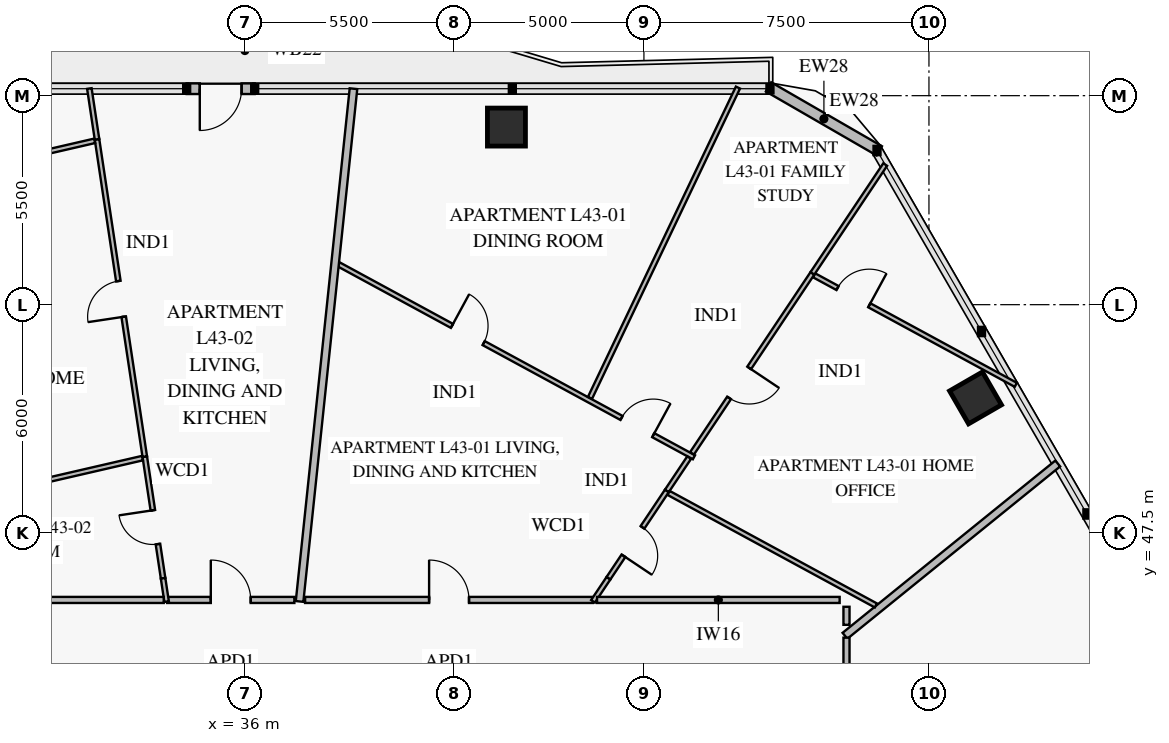
"""IFC4 building model, lengths in metres.
Left out: names, types, materials, properties, quantities, classifications, styles, units other than length and angle.
Written with IfcOpenShell. Run it as: python <this file> out.ifc"""

import sys

from ifc_helpers import new_model, si_unit, direction, frame, frame_2d, origin, origin_2d, place, context, subcontext, project, spatial, rectangle, extrude, element, fill, save


model = new_model("IFC4")
c1 = context("Model", 3, precision=1e-05, world=origin(), true_north=direction((0.0, 1.0)))
c2 = subcontext(c1, "Body", "Model", "MODEL_VIEW")
j1 = project(units=[si_unit("LENGTHUNIT", "METRE"), si_unit("PLANEANGLEUNIT", "RADIAN")], contexts=[c1])
p1 = place(None, origin())
s1 = spatial("IfcSite", under=j1, at=p1, CompositionType="ELEMENT")
p2 = place(p1, origin())
s2 = spatial("IfcBuilding", under=s1, at=p2, CompositionType="ELEMENT")
p3 = place(p2, frame((0.0, 0.0, 173.2)))
s3 = spatial("IfcBuildingStorey", under=s2, at=p3, CompositionType="ELEMENT", Elevation=173.2)
for number, where, z_axis, x_axis in (
    (1, (55.226, 51.047, 0.0), (0.0, 0.0, 1.0), (-0.5, 0.866, 0.0)),
    (2, (42.882, 58.173, 0.0), (0.0, 0.0, 1.0), (-1.0, 0.0, 0.0)),
):
    element("IfcColumn", number, at=place(p3, frame(where, z_axis=z_axis, x_axis=x_axis)), inside=s3, PredefinedType="COLUMN", context=c2, shape_type="SweptSolid", body=[
        extrude(rectangle(XDim=1.0, YDim=1.0, at=origin_2d()), origin(), (0.0, 0.0, 1.0), 3.55),
    ])
p4 = place(p3, frame((34.468, 59.183, 0.0), z_axis=(0.0, 0.0, 1.0), x_axis=(1.0, 0.0, 0.0)))
e3 = element("IfcWall", 3, at=p4, inside=s3, PredefinedType="SOLIDWALL", context=c2, shape_type="SweptSolid", body=[
    extrude(rectangle(XDim=1.79, YDim=0.28, at=frame_2d((0.895, 0.0))), origin(), (0.0, 0.0, 1.0), 3.55),
])
p5 = place(p4, frame((0.345, 0.0, 0.0)))
e4 = element("IfcOpeningElement", 4, at=p5, cuts=e3, PredefinedType="OPENING", context=c2, shape_type="SweptSolid", body=[
    extrude(rectangle(XDim=1.1, YDim=2.2, at=frame_2d((0.55, 1.1))), frame((0.0, 0.152, 0.0), z_axis=(0.0, -1.0, 0.0), x_axis=(1.0, 0.0, 0.0)), (0.0, 0.0, 1.0), 0.304),
])
p6 = place(p3, frame((49.779, 59.231, 0.0), z_axis=(0.0, 0.0, 1.0), x_axis=(0.866020068361, -0.500009241111, 0.0)))
e5 = element("IfcWall", 5, at=p6, inside=s3, PredefinedType="SOLIDWALL", context=c2, shape_type="SweptSolid", body=[
    extrude(rectangle(XDim=3.365, YDim=0.28, at=frame_2d((1.683, 0.0))), origin(), (0.0, 0.0, 1.0), 3.55),
])
p7 = place(p3, frame((47.816, 49.484, 0.0), z_axis=(0.0, 0.0, 1.0), x_axis=(-0.878822079669, 0.477149612057, 0.0)))
e6 = element("IfcWall", 6, at=p7, inside=s3, PredefinedType="PARTITIONING", context=c2, shape_type="SweptSolid", body=[
    extrude(rectangle(XDim=10.635, YDim=0.12, at=frame_2d((5.318, 0.0))), origin(), (0.0, 0.0, 1.0), 2.9),
])
p8 = place(p7, frame((1.218, 0.0, 0.0)))
e7 = element("IfcOpeningElement", 7, at=p8, cuts=e6, PredefinedType="OPENING", context=c2, shape_type="SweptSolid", body=[
    extrude(rectangle(XDim=0.95, YDim=2.1, at=frame_2d((0.475, 1.05))), frame((0.0, 0.072, 0.0), z_axis=(0.0, -1.0, 0.0), x_axis=(1.0, 0.0, 0.0)), (0.0, 0.0, 1.0), 0.144),
])
p9 = place(p7, frame((6.296, 0.0, 0.0)))
e8 = element("IfcOpeningElement", 8, at=p9, cuts=e6, PredefinedType="OPENING", context=c2, shape_type="SweptSolid", body=[
    extrude(rectangle(XDim=0.95, YDim=2.1, at=frame_2d((0.475, 1.05))), frame((0.0, 0.072, 0.0), z_axis=(0.0, -1.0, 0.0), x_axis=(1.0, 0.0, 0.0)), (0.0, 0.0, 1.0), 0.144),
])
p10 = place(p3, frame((45.566, 46.3, 0.0), z_axis=(0.0, 0.0, 1.0), x_axis=(0.55600296576, 0.831180306592, 0.0)))
e9 = element("IfcWall", 9, at=p10, inside=s3, PredefinedType="PARTITIONING", context=c2, shape_type="SweptSolid", body=[
    extrude(rectangle(XDim=2.766, YDim=0.12, at=frame_2d((1.383, 0.0))), origin(), (0.0, 0.0, 1.0), 3.55),
])
p11 = place(p10, frame((0.712, 0.0, 0.0)))
e10 = element("IfcOpeningElement", 10, at=p11, cuts=e9, PredefinedType="OPENING", context=c2, shape_type="SweptSolid", body=[
    extrude(rectangle(XDim=0.9, YDim=2.1, at=frame_2d((0.45, 1.05))), frame((0.0, 0.072, 0.0), z_axis=(0.0, -1.0, 0.0), x_axis=(1.0, 0.0, 0.0)), (0.0, 0.0, 1.0), 0.144),
])
p12 = place(p3, frame((47.104, 48.599, 0.0), z_axis=(0.0, 0.0, 1.0), x_axis=(0.555875532835, 0.831265536393, 0.0)))
e11 = element("IfcWall", 11, at=p12, inside=s3, PredefinedType="PARTITIONING", context=c2, shape_type="SweptSolid", body=[
    extrude(rectangle(XDim=1.054, YDim=0.12, at=frame_2d((0.527, 0.0))), origin(), (0.0, 0.0, 1.0), 3.55),
])
p13 = place(p3, frame((47.766, 49.589, 0.0), z_axis=(0.0, 0.0, 1.0), x_axis=(0.556024553712, 0.831165865317, 0.0)))
e12 = element("IfcWall", 12, at=p13, inside=s3, PredefinedType="PARTITIONING", context=c2, shape_type="SweptSolid", body=[
    extrude(rectangle(XDim=5.698, YDim=0.12, at=frame_2d((2.849, 0.0))), origin(), (0.0, 0.0, 1.0), 2.87),
])
p14 = place(p13, frame((1.753, 0.0, 0.0)))
e13 = element("IfcOpeningElement", 13, at=p14, cuts=e12, PredefinedType="OPENING", context=c2, shape_type="SweptSolid", body=[
    extrude(rectangle(XDim=0.95, YDim=2.1, at=frame_2d((0.475, 1.05))), frame((0.0, 0.072, 0.0), z_axis=(0.0, -1.0, 0.0), x_axis=(1.0, 0.0, 0.0)), (0.0, 0.0, 1.0), 0.144),
])
p15 = place(p3, frame((56.286, 51.39, 0.0), z_axis=(0.0, 0.0, 1.0), x_axis=(-0.878808858822, 0.477173961628, 0.0)))
e14 = element("IfcWall", 14, at=p15, inside=s3, PredefinedType="PARTITIONING", context=c2, shape_type="SweptSolid", body=[
    extrude(rectangle(XDim=6.037, YDim=0.12, at=frame_2d((3.019, 0.0))), origin(), (0.0, 0.0, 1.0), 3.122),
])
p16 = place(p15, frame((4.388, 0.0, 0.0)))
e15 = element("IfcOpeningElement", 15, at=p16, cuts=e14, PredefinedType="OPENING", context=c2, shape_type="SweptSolid", body=[
    extrude(rectangle(XDim=0.95, YDim=2.1, at=frame_2d((0.475, 1.05))), frame((0.0, 0.072, 0.0), z_axis=(0.0, -1.0, 0.0), x_axis=(1.0, 0.0, 0.0)), (0.0, 0.0, 1.0), 0.144),
])
p17 = place(p3, frame((45.16, 45.73, 0.0), z_axis=(0.0, 0.0, 1.0), x_axis=(-1.0, 0.0, 0.0)))
e16 = element("IfcWall", 16, at=p17, inside=s3, PredefinedType="PARTITIONING", context=c2, shape_type="SweptSolid", body=[
    extrude(rectangle(XDim=7.576, YDim=0.16, at=frame_2d((3.788, 0.0))), origin(), (0.0, 0.0, 1.0), 2.9),
])
p18 = place(p17, frame((3.263, 0.0, 0.0)))
e17 = element("IfcOpeningElement", 17, at=p18, cuts=e16, PredefinedType="OPENING", context=c2, shape_type="SweptSolid", body=[
    extrude(rectangle(XDim=1.05, YDim=2.15, at=frame_2d((0.525, 1.075))), frame((0.0, 0.092, 0.0), z_axis=(0.0, -1.0, 0.0), x_axis=(1.0, 0.0, 0.0)), (0.0, 0.0, 1.0), 0.184),
])
p19 = place(p3, frame((33.848, 46.3, 0.0), z_axis=(0.0, 0.0, 1.0), x_axis=(-0.148934116093, 0.988847121179, 0.0)))
e18 = element("IfcWall", 18, at=p19, inside=s3, PredefinedType="PARTITIONING", context=c2, shape_type="SweptSolid", body=[
    extrude(rectangle(XDim=3.238, YDim=0.12, at=frame_2d((1.619, 0.0))), origin(), (0.0, 0.0, 1.0), 3.55),
])
p20 = place(p19, frame((0.91, 0.0, 0.0)))
e19 = element("IfcOpeningElement", 19, at=p20, cuts=e18, PredefinedType="OPENING", context=c2, shape_type="SweptSolid", body=[
    extrude(rectangle(XDim=0.9, YDim=2.1, at=frame_2d((0.45, 1.05))), frame((0.0, 0.072, 0.0), z_axis=(0.0, -1.0, 0.0), x_axis=(1.0, 0.0, 0.0)), (0.0, 0.0, 1.0), 0.144),
])
p21 = place(p3, frame((33.365, 49.501, 0.0), z_axis=(0.0, 0.0, 1.0), x_axis=(-0.148816904755, 0.988864767731, 0.0)))
e20 = element("IfcWall", 20, at=p21, inside=s3, PredefinedType="PARTITIONING", context=c2, shape_type="SweptSolid", body=[
    extrude(rectangle(XDim=8.444, YDim=0.12, at=frame_2d((4.222, 0.0))), origin(), (0.0, 0.0, 1.0), 3.15),
])
p22 = place(p21, frame((3.722, 0.0, 0.0)))
e21 = element("IfcOpeningElement", 21, at=p22, cuts=e20, PredefinedType="OPENING", context=c2, shape_type="SweptSolid", body=[
    extrude(rectangle(XDim=0.95, YDim=2.1, at=frame_2d((0.475, 1.05))), frame((0.0, 0.072, 0.0), z_axis=(0.0, -1.0, 0.0), x_axis=(1.0, 0.0, 0.0)), (0.0, 0.0, 1.0), 0.144),
])
p23 = place(p3, frame((32.046, 57.811, 0.0), z_axis=(0.0, 0.0, 1.0), x_axis=(-0.974371328586, -0.22494558015, 0.0)))
e22 = element("IfcWall", 22, at=p23, inside=s3, PredefinedType="PARTITIONING", context=c2, shape_type="SweptSolid", body=[
    extrude(rectangle(XDim=10.772, YDim=0.12, at=frame_2d((5.386, 0.0))), origin(), (0.0, 0.0, 1.0), 2.87),
])
p24 = place(p23, frame((4.826, 0.0, 0.0)))
e23 = element("IfcOpeningElement", 23, at=p24, cuts=e22, PredefinedType="OPENING", context=c2, shape_type="SweptSolid", body=[
    extrude(rectangle(XDim=0.95, YDim=2.1, at=frame_2d((0.475, 1.05))), frame((0.0, 0.072, 0.0), z_axis=(0.0, -1.0, 0.0), x_axis=(1.0, 0.0, 0.0)), (0.0, 0.0, 1.0), 0.144),
])
p25 = place(p3, frame((37.302, 45.73, 0.0), z_axis=(0.0, 0.0, 1.0), x_axis=(-1.0, 0.0, 0.0)))
e24 = element("IfcWall", 24, at=p25, inside=s3, PredefinedType="PARTITIONING", context=c2, shape_type="SweptSolid", body=[
    extrude(rectangle(XDim=3.348, YDim=0.16, at=frame_2d((1.674, 0.0))), origin(), (0.0, 0.0, 1.0), 3.55),
])
p26 = place(p25, frame((1.149, 0.0, 0.0)))
e25 = element("IfcOpeningElement", 25, at=p26, cuts=e24, PredefinedType="OPENING", context=c2, shape_type="SweptSolid", body=[
    extrude(rectangle(XDim=1.05, YDim=2.15, at=frame_2d((0.525, 1.075))), frame((0.0, 0.092, 0.0), z_axis=(0.0, -1.0, 0.0), x_axis=(1.0, 0.0, 0.0)), (0.0, 0.0, 1.0), 0.184),
])
p27 = place(p3, frame((51.79, 44.787, 0.0), z_axis=(0.0, 0.0, 1.0), x_axis=(0.777161996324, 0.629300589122, 0.0)))
e26 = element("IfcWall", 26, at=p27, inside=s3, PredefinedType="PARTITIONING", context=c2, shape_type="SweptSolid", body=[
    extrude(rectangle(XDim=7.204, YDim=0.2, at=frame_2d((3.602, 0.0))), origin(), (0.0, 0.0, 1.0), 2.87),
])
p28 = place(p3, frame((45.081, 51.047, 0.0), z_axis=(0.0, 0.0, 1.0), x_axis=(0.430349402059, 0.902662391012, 0.0)))
e27 = element("IfcWall", 27, at=p28, inside=s3, PredefinedType="PARTITIONING", context=c2, shape_type="SweptSolid", body=[
    extrude(rectangle(XDim=9.047, YDim=0.12, at=frame_2d((4.523, 0.0))), origin(), (0.0, 0.0, 1.0), 2.87),
])
p29 = place(p3, frame((45.16, 45.694, 0.0), z_axis=(0.0, 0.0, 1.0), x_axis=(0.556167472671, 0.831070239115, 0.0)))
e28 = element("IfcWall", 28, at=p29, inside=s3, PredefinedType="PARTITIONING", context=c2, shape_type="SweptSolid", body=[
    extrude(rectangle(XDim=0.729, YDim=0.12, at=frame_2d((0.365, 0.0))), origin(), (0.0, 0.0, 1.0), 3.55),
])
p30 = place(p3, frame((50.934, 54.325, 0.0), z_axis=(0.0, 0.0, 1.0), x_axis=(0.556024334098, 0.831166012233, 0.0)))
e29 = element("IfcWall", 29, at=p30, inside=s3, PredefinedType="PARTITIONING", context=c2, shape_type="SweptSolid", body=[
    extrude(rectangle(XDim=3.445, YDim=0.12, at=frame_2d((1.722, 0.0))), origin(), (0.0, 0.0, 1.0), 3.55),
])
p31 = place(p3, frame((52.604, 45.585, 0.0), z_axis=(0.0, 0.0, 1.0), x_axis=(-0.878827510453, 0.477139609413, 0.0)))
e30 = element("IfcWall", 30, at=p31, inside=s3, PredefinedType="PARTITIONING", context=c2, shape_type="SweptSolid", body=[
    extrude(rectangle(XDim=6.206, YDim=0.12, at=frame_2d((3.103, 0.0))), origin(), (0.0, 0.0, 1.0), 2.9),
])
p32 = place(p3, frame((37.439, 45.69, 0.0), z_axis=(0.0, 0.0, 1.0), x_axis=(0.104530227492, 0.994521709939, 0.0)))
e31 = element("IfcWall", 31, at=p32, inside=s3, PredefinedType="PARTITIONING", context=c2, shape_type="SweptSolid", body=[
    extrude(rectangle(XDim=13.567, YDim=0.2, at=frame_2d((6.784, 0.0))), origin(), (0.0, 0.0, 1.0), 2.87),
])
p33 = place(p3, frame((33.94, 45.685, 0.0), z_axis=(0.0, 0.0, 1.0), x_axis=(-0.148839731884, 0.988861332146, 0.0)))
e32 = element("IfcWall", 32, at=p33, inside=s3, PredefinedType="PARTITIONING", context=c2, shape_type="SweptSolid", body=[
    extrude(rectangle(XDim=0.622, YDim=0.12, at=frame_2d((0.311, 0.0))), origin(), (0.0, 0.0, 1.0), 3.55),
])
p34 = place(p3, frame((32.109, 57.851, 0.0), z_axis=(0.0, 0.0, 1.0), x_axis=(-0.148826194804, 0.988863369602, 0.0)))
e33 = element("IfcWall", 33, at=p34, inside=s3, PredefinedType="PARTITIONING", context=c2, shape_type="SweptSolid", body=[
    extrude(rectangle(XDim=1.352, YDim=0.12, at=frame_2d((0.676, 0.0))), origin(), (0.0, 0.0, 1.0), 2.87),
])
p35 = place(p3, frame((33.303, 49.461, 0.0), z_axis=(0.0, 0.0, 1.0), x_axis=(-0.97437372251, -0.224935210409, 0.0)))
e34 = element("IfcWall", 34, at=p35, inside=s3, PredefinedType="PARTITIONING", context=c2, shape_type="SweptSolid", body=[
    extrude(rectangle(XDim=7.301, YDim=0.12, at=frame_2d((3.651, 0.0))), origin(), (0.0, 0.0, 1.0), 2.9),
])
p36 = place(p3, frame((51.65, 45.73, 0.0), z_axis=(0.0, 0.0, 1.0), x_axis=(-1.0, 0.0, 0.0)))
e35 = element("IfcWall", 35, at=p36, inside=s3, PredefinedType="PARTITIONING", context=c2, shape_type="SweptSolid", body=[
    extrude(rectangle(XDim=6.384, YDim=0.16, at=frame_2d((3.192, 0.0))), origin(), (0.0, 0.0, 1.0), 2.9),
])
p37 = place(p3, frame((51.83, 45.075, 0.0), z_axis=(0.0, 0.0, 1.0), x_axis=(0.0, 1.0, 0.0)))
e36 = element("IfcWall", 36, at=p37, inside=s3, PredefinedType="PARTITIONING", context=c2, shape_type="SweptSolid", body=[
    extrude(rectangle(XDim=0.475, YDim=0.16, at=frame_2d((0.237, 0.0))), origin(), (0.0, 0.0, 1.0), 3.55),
])
p38 = place(p3, frame((33.865, 45.73, 0.0), z_axis=(0.0, 0.0, 1.0), x_axis=(-1.0, 0.0, 0.0)))
e37 = element("IfcWall", 37, at=p38, inside=s3, PredefinedType="PARTITIONING", context=c2, shape_type="SweptSolid", body=[
    extrude(rectangle(XDim=6.255, YDim=0.16, at=frame_2d((3.127, 0.0))), origin(), (0.0, 0.0, 1.0), 2.9),
])
p39 = place(p3, frame((51.83, 41.85, 0.0), z_axis=(0.0, 0.0, 1.0), x_axis=(0.0, 1.0, 0.0)))
e38 = element("IfcWall", 38, at=p39, inside=s3, PredefinedType="PARTITIONING", context=c2, shape_type="SweptSolid", body=[
    extrude(rectangle(XDim=2.887, YDim=0.16, at=frame_2d((1.443, 0.0))), origin(), (0.0, 0.0, 1.0), 3.15),
])
p40 = place(p5, frame((1.1, 0.0, 0.0), z_axis=(0.0, 0.0, 1.0), x_axis=(-1.0, 0.0, 0.0)))
e39 = element("IfcDoor", 39, at=p40, inside=s3, OperationType="SINGLE_SWING_RIGHT", PredefinedType="DOOR", context=c2, shape_type="SweptSolid", body=[
    extrude(rectangle(XDim=1.1, YDim=2.2, at=frame_2d((0.55, 1.1))), frame((0.0, 0.025, 0.0), z_axis=(0.0, -1.0, 0.0), x_axis=(1.0, 0.0, 0.0)), (0.0, 0.0, 1.0), 0.05),
])
fill(e4, e39)
p41 = place(p8, frame((0.95, 0.0, 0.0), z_axis=(0.0, 0.0, 1.0), x_axis=(-1.0, 0.0, 0.0)))
e40 = element("IfcDoor", 40, at=p41, inside=s3, OperationType="SINGLE_SWING_RIGHT", PredefinedType="DOOR", context=c2, shape_type="SweptSolid", body=[
    extrude(rectangle(XDim=0.95, YDim=2.1, at=frame_2d((0.475, 1.05))), frame((0.0, 0.025, 0.0), z_axis=(0.0, -1.0, 0.0), x_axis=(1.0, 0.0, 0.0)), (0.0, 0.0, 1.0), 0.05),
])
fill(e7, e40)
p42 = place(p9, frame((0.95, 0.0, 0.0), z_axis=(0.0, 0.0, 1.0), x_axis=(-1.0, 0.0, 0.0)))
e41 = element("IfcDoor", 41, at=p42, inside=s3, OperationType="SINGLE_SWING_LEFT", PredefinedType="DOOR", context=c2, shape_type="SweptSolid", body=[
    extrude(rectangle(XDim=0.95, YDim=2.1, at=frame_2d((0.475, 1.05))), frame((0.0, 0.025, 0.0), z_axis=(0.0, -1.0, 0.0), x_axis=(1.0, 0.0, 0.0)), (0.0, 0.0, 1.0), 0.05),
])
fill(e8, e41)
p43 = place(p11, frame((0.9, 0.0, 0.0), z_axis=(0.0, 0.0, 1.0), x_axis=(-1.0, 0.0, 0.0)))
e42 = element("IfcDoor", 42, at=p43, inside=s3, OperationType="SINGLE_SWING_RIGHT", PredefinedType="DOOR", context=c2, shape_type="SweptSolid", body=[
    extrude(rectangle(XDim=0.9, YDim=2.1, at=frame_2d((0.45, 1.05))), frame((0.0, 0.025, 0.0), z_axis=(0.0, -1.0, 0.0), x_axis=(1.0, 0.0, 0.0)), (0.0, 0.0, 1.0), 0.05),
])
fill(e10, e42)
p44 = place(p14, frame((0.95, 0.0, 0.0), z_axis=(0.0, 0.0, 1.0), x_axis=(-1.0, 0.0, 0.0)))
e43 = element("IfcDoor", 43, at=p44, inside=s3, OperationType="SINGLE_SWING_LEFT", PredefinedType="DOOR", context=c2, shape_type="SweptSolid", body=[
    extrude(rectangle(XDim=0.95, YDim=2.1, at=frame_2d((0.475, 1.05))), frame((0.0, 0.025, 0.0), z_axis=(0.0, -1.0, 0.0), x_axis=(1.0, 0.0, 0.0)), (0.0, 0.0, 1.0), 0.05),
])
fill(e13, e43)
p45 = place(p16, frame((0.95, 0.0, 0.0), z_axis=(0.0, 0.0, 1.0), x_axis=(-1.0, 0.0, 0.0)))
e44 = element("IfcDoor", 44, at=p45, inside=s3, OperationType="SINGLE_SWING_RIGHT", PredefinedType="DOOR", context=c2, shape_type="SweptSolid", body=[
    extrude(rectangle(XDim=0.95, YDim=2.1, at=frame_2d((0.475, 1.05))), frame((0.0, 0.025, 0.0), z_axis=(0.0, -1.0, 0.0), x_axis=(1.0, 0.0, 0.0)), (0.0, 0.0, 1.0), 0.05),
])
fill(e15, e44)
p46 = place(p18, frame((1.05, 0.0, 0.0), z_axis=(0.0, 0.0, 1.0), x_axis=(-1.0, 0.0, 0.0)))
e45 = element("IfcDoor", 45, at=p46, inside=s3, OperationType="SINGLE_SWING_LEFT", PredefinedType="DOOR", context=c2, shape_type="SweptSolid", body=[
    extrude(rectangle(XDim=1.05, YDim=2.15, at=frame_2d((0.525, 1.075))), frame((0.0, 0.025, 0.0), z_axis=(0.0, -1.0, 0.0), x_axis=(1.0, 0.0, 0.0)), (0.0, 0.0, 1.0), 0.05),
])
fill(e17, e45)
p47 = place(p20, origin())
e46 = element("IfcDoor", 46, at=p47, inside=s3, OperationType="SINGLE_SWING_RIGHT", PredefinedType="DOOR", context=c2, shape_type="SweptSolid", body=[
    extrude(rectangle(XDim=0.9, YDim=2.1, at=frame_2d((0.45, 1.05))), frame((0.0, 0.025, 0.0), z_axis=(0.0, -1.0, 0.0), x_axis=(1.0, 0.0, 0.0)), (0.0, 0.0, 1.0), 0.05),
])
fill(e19, e46)
p48 = place(p22, origin())
e47 = element("IfcDoor", 47, at=p48, inside=s3, OperationType="SINGLE_SWING_LEFT", PredefinedType="DOOR", context=c2, shape_type="SweptSolid", body=[
    extrude(rectangle(XDim=0.95, YDim=2.1, at=frame_2d((0.475, 1.05))), frame((0.0, 0.025, 0.0), z_axis=(0.0, -1.0, 0.0), x_axis=(1.0, 0.0, 0.0)), (0.0, 0.0, 1.0), 0.05),
])
fill(e21, e47)
p49 = place(p26, frame((1.05, 0.0, 0.0), z_axis=(0.0, 0.0, 1.0), x_axis=(-1.0, 0.0, 0.0)))
e48 = element("IfcDoor", 48, at=p49, inside=s3, OperationType="SINGLE_SWING_LEFT", PredefinedType="DOOR", context=c2, shape_type="SweptSolid", body=[
    extrude(rectangle(XDim=1.05, YDim=2.15, at=frame_2d((0.525, 1.075))), frame((0.0, 0.025, 0.0), z_axis=(0.0, -1.0, 0.0), x_axis=(1.0, 0.0, 0.0)), (0.0, 0.0, 1.0), 0.05),
])
fill(e25, e48)
save(model, sys.argv[1])
